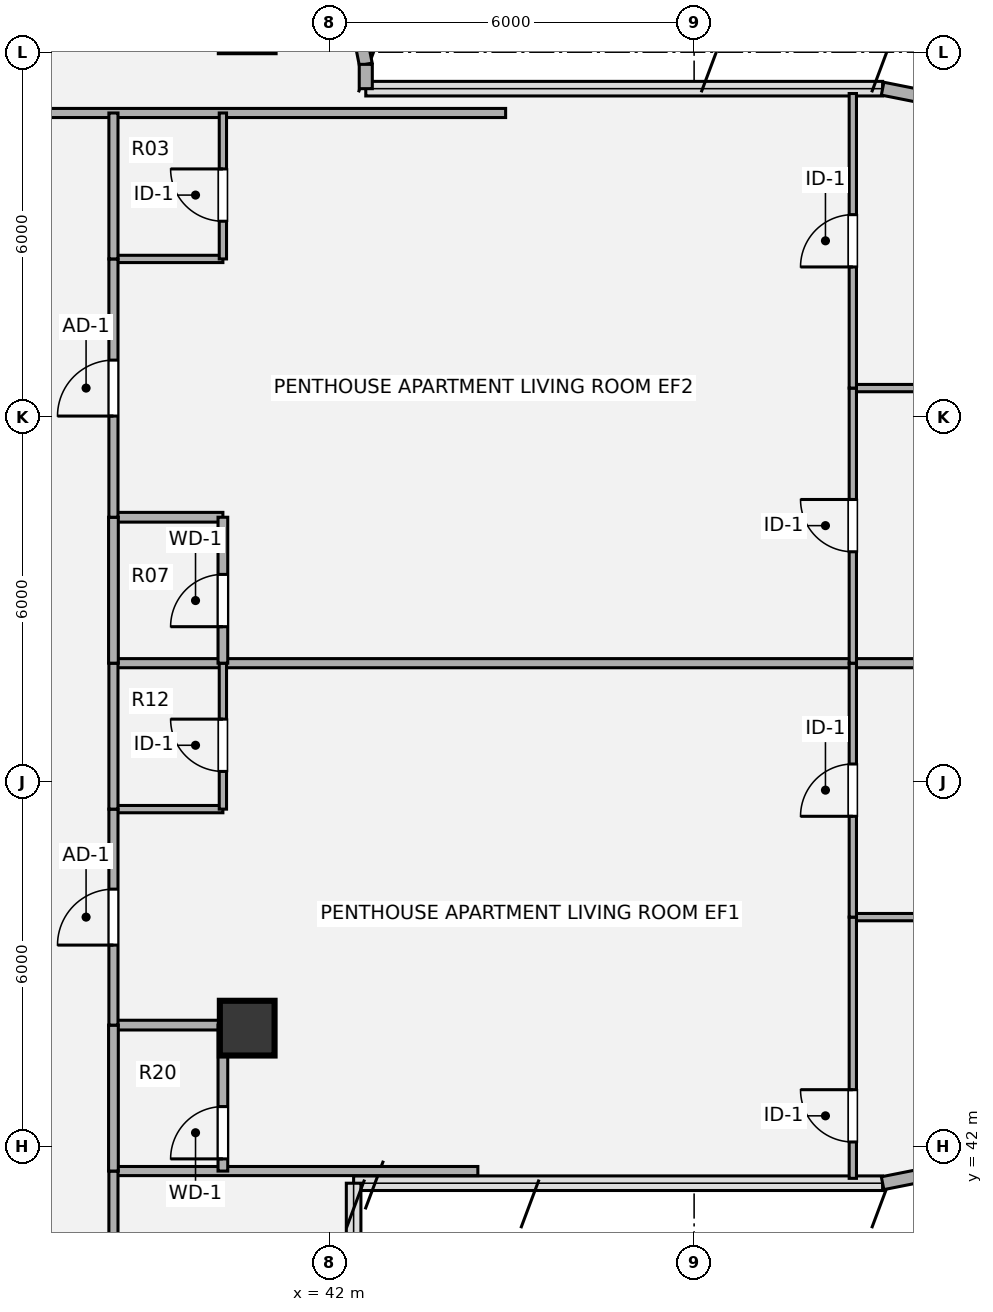
"""IFC4 building model, lengths in metres.
Left out: names, types, materials, properties, quantities, classifications, styles, units other than length and angle.
Written with IfcOpenShell. Run it as: python <this file> out.ifc"""

import sys

from ifc_helpers import new_model, si_unit, direction, frame, frame_2d, origin, origin_2d, place, context, subcontext, project, spatial, rectangle, hollow_circle, extrude, source, transform, mapped, element, fill, save


model = new_model("IFC4")
c1 = context("Model", 3, precision=1e-05, world=origin(), true_north=direction((0.0, 1.0)))
c2 = subcontext(c1, "Body", "Model", "MODEL_VIEW")
j1 = project(units=[si_unit("LENGTHUNIT", "METRE"), si_unit("PLANEANGLEUNIT", "RADIAN")], contexts=[c1])
p1 = place(None, origin())
s1 = spatial("IfcSite", under=j1, at=p1, CompositionType="ELEMENT")
p2 = place(p1, origin())
s2 = spatial("IfcBuilding", under=s1, at=p2, CompositionType="ELEMENT")
p3 = place(p2, frame((0.0, 0.0, 230.58)))
s3 = spatial("IfcBuildingStorey", under=s2, at=p3, CompositionType="ELEMENT", Elevation=230.58)
m1 = source(origin(), c2, "Body", "SweptSolid", [
    extrude(hollow_circle(Radius=0.45, WallThickness=0.032, at=origin_2d()), origin(), (0.0, 0.0, 1.0), 3.78),
])
p4 = place(p3, frame((40.65, 43.95, 0.0), z_axis=(0.0, 0.0, 1.0), x_axis=(1.0, 0.0, 0.0)))
e1 = element("IfcColumn", 1, at=p4, inside=s3, PredefinedType="COLUMN", context=c2, shape_type="MappedRepresentation", body=[
    mapped(m1, transform((0.0, 0.0, 0.0), x_axis=(1.0, 0.0, 0.0), y_axis=(0.0, 1.0, 0.0), z_axis=(0.0, 0.0, 1.0), scale=1.0)),
])
p5 = place(p3, frame((42.402, 60.795, 0.0), z_axis=(0.0, 0.0, 1.0), x_axis=(0.195190360752, -0.980765376158, 0.0)))
e2 = element("IfcWall", 2, at=p5, inside=s3, PredefinedType="SOLIDWALL", context=c2, shape_type="SweptSolid", body=[
    extrude(rectangle(XDim=1.014, YDim=0.215, at=frame_2d((0.507, 0.0))), origin(), (0.0, 0.0, 1.0), 3.53),
])
p6 = place(p3, frame((42.6, 59.8, 0.0), z_axis=(0.0, 0.0, 1.0), x_axis=(0.0, -1.0, 0.0)))
e3 = element("IfcWall", 3, at=p6, inside=s3, PredefinedType="SOLIDWALL", context=c2, shape_type="SweptSolid", body=[
    extrude(rectangle(XDim=0.4, YDim=0.215, at=frame_2d((0.2, 0.0))), origin(), (0.0, 0.0, 1.0), 3.53),
])
for number, where, z_axis, x_axis in (
    (4, (51.1, 59.4, 0.0), (0.0, 0.0, 1.0), (0.981, -0.195, 0.0)),
    (5, (52.325, 41.644, 0.0), (0.0, 0.0, 1.0), (-0.981, -0.195, 0.0)),
):
    element("IfcWall", number, at=place(p3, frame(where, z_axis=z_axis, x_axis=x_axis)), inside=s3, PredefinedType="SOLIDWALL", context=c2, shape_type="SweptSolid", body=[
        extrude(rectangle(XDim=1.249, YDim=0.215, at=frame_2d((0.624, 0.0))), origin(), (0.0, 0.0, 1.0), 3.53),
    ])
p7 = place(p3, frame((38.45, 41.6, 0.0), z_axis=(0.0, 0.0, 1.0), x_axis=(1.0, 0.0, 0.0)))
e6 = element("IfcWall", 6, at=p7, inside=s3, PredefinedType="PARTITIONING", context=c2, shape_type="SweptSolid", body=[
    extrude(rectangle(XDim=5.993, YDim=0.15, at=frame_2d((2.997, 0.0))), origin(), (0.0, 0.0, 1.0), 3.5),
])
p8 = place(p3, frame((38.45, 44.0, 0.0), z_axis=(0.0, 0.0, 1.0), x_axis=(1.0, 0.0, 0.0)))
e7 = element("IfcWall", 7, at=p8, inside=s3, PredefinedType="PLUMBINGWALL", context=c2, shape_type="SweptSolid", body=[
    extrude(rectangle(XDim=1.8, YDim=0.16, at=frame_2d((0.9, 0.0))), origin(), (0.0, 0.0, 1.0), 2.903),
])
p9 = place(p3, frame((50.61, 45.776, 0.0), z_axis=(0.0, 0.0, 1.0), x_axis=(1.0, 0.0, 0.0)))
e8 = element("IfcWall", 8, at=p9, inside=s3, PredefinedType="PARTITIONING", context=c2, shape_type="SweptSolid", body=[
    extrude(rectangle(XDim=3.61, YDim=0.12, at=frame_2d((1.805, 0.0))), origin(), (0.0, 0.0, 1.0), 2.982),
])
p10 = place(p3, frame((38.45, 47.552, 0.0), z_axis=(0.0, 0.0, 1.0), x_axis=(1.0, 0.0, 0.0)))
e9 = element("IfcWall", 9, at=p10, inside=s3, PredefinedType="PARTITIONING", context=c2, shape_type="SweptSolid", body=[
    extrude(rectangle(XDim=1.8, YDim=0.12, at=frame_2d((0.9, 0.0))), origin(), (0.0, 0.0, 1.0), 3.259),
])
p11 = place(p3, frame((38.45, 49.952, 0.0), z_axis=(0.0, 0.0, 1.0), x_axis=(1.0, 0.0, 0.0)))
e10 = element("IfcWall", 10, at=p11, inside=s3, PredefinedType="PARTITIONING", context=c2, shape_type="SweptSolid", body=[
    extrude(rectangle(XDim=15.77, YDim=0.15, at=frame_2d((7.885, 0.0))), origin(), (0.0, 0.0, 1.0), 2.982),
])
p12 = place(p3, frame((38.45, 52.352, 0.0), z_axis=(0.0, 0.0, 1.0), x_axis=(1.0, 0.0, 0.0)))
e11 = element("IfcWall", 11, at=p12, inside=s3, PredefinedType="PLUMBINGWALL", context=c2, shape_type="SweptSolid", body=[
    extrude(rectangle(XDim=1.8, YDim=0.16, at=frame_2d((0.9, 0.0))), origin(), (0.0, 0.0, 1.0), 3.259),
])
p13 = place(p3, frame((50.61, 54.476, 0.0), z_axis=(0.0, 0.0, 1.0), x_axis=(1.0, 0.0, 0.0)))
e12 = element("IfcWall", 12, at=p13, inside=s3, PredefinedType="PARTITIONING", context=c2, shape_type="SweptSolid", body=[
    extrude(rectangle(XDim=3.61, YDim=0.12, at=frame_2d((1.805, 0.0))), origin(), (0.0, 0.0, 1.0), 2.903),
])
p14 = place(p3, frame((38.45, 56.6, 0.0), z_axis=(0.0, 0.0, 1.0), x_axis=(1.0, 0.0, 0.0)))
e13 = element("IfcWall", 13, at=p14, inside=s3, PredefinedType="PARTITIONING", context=c2, shape_type="SweptSolid", body=[
    extrude(rectangle(XDim=1.8, YDim=0.12, at=frame_2d((0.9, 0.0))), origin(), (0.0, 0.0, 1.0), 3.259),
])
p15 = place(p3, frame((27.1, 59.0, 0.0), z_axis=(0.0, 0.0, 1.0), x_axis=(1.0, 0.0, 0.0)))
e14 = element("IfcWall", 14, at=p15, inside=s3, PredefinedType="PARTITIONING", context=c2, shape_type="SweptSolid", body=[
    extrude(rectangle(XDim=17.8, YDim=0.15, at=frame_2d((8.9, 0.0))), origin(), (0.0, 0.0, 1.0), 3.308),
])
p16 = place(p15, frame((8.375, 0.0, 0.0)))
e15 = element("IfcOpeningElement", 15, at=p16, cuts=e14, PredefinedType="OPENING", context=c2, shape_type="SweptSolid", body=[
    extrude(rectangle(XDim=1.05, YDim=2.1, at=origin_2d()), frame((0.525, 0.085, 1.05), z_axis=(0.0, -1.0, 0.0), x_axis=(1.0, 0.0, 0.0)), (0.0, 0.0, 1.0), 0.17),
])
p17 = place(p3, frame((38.45, 22.4, 0.0), z_axis=(0.0, 0.0, 1.0), x_axis=(0.0, 1.0, 0.0)))
e16 = element("IfcWall", 16, at=p17, inside=s3, PredefinedType="PARTITIONING", context=c2, shape_type="SweptSolid", body=[
    extrude(rectangle(XDim=19.2, YDim=0.15, at=frame_2d((9.6, 0.0))), origin(), (0.0, 0.0, 1.0), 3.5),
])
p18 = place(p17, frame((8.975, 0.0, 0.0)))
e17 = element("IfcOpeningElement", 17, at=p18, cuts=e16, PredefinedType="OPENING", context=c2, shape_type="SweptSolid", body=[
    extrude(rectangle(XDim=1.05, YDim=2.1, at=origin_2d()), frame((0.525, 0.085, 1.05), z_axis=(0.0, -1.0, 0.0), x_axis=(1.0, 0.0, 0.0)), (0.0, 0.0, 1.0), 0.17),
])
p19 = place(p3, frame((38.45, 41.6, 0.0), z_axis=(0.0, 0.0, 1.0), x_axis=(0.0, 1.0, 0.0)))
e18 = element("IfcWall", 18, at=p19, inside=s3, PredefinedType="PLUMBINGWALL", context=c2, shape_type="SweptSolid", body=[
    extrude(rectangle(XDim=2.4, YDim=0.16, at=frame_2d((1.2, 0.0))), origin(), (0.0, 0.0, 1.0), 3.5),
])
p20 = place(p3, frame((38.45, 44.0, 0.0), z_axis=(0.0, 0.0, 1.0), x_axis=(0.0, 1.0, 0.0)))
e19 = element("IfcWall", 19, at=p20, inside=s3, PredefinedType="PARTITIONING", context=c2, shape_type="SweptSolid", body=[
    extrude(rectangle(XDim=3.552, YDim=0.15, at=frame_2d((1.776, 0.0))), origin(), (0.0, 0.0, 1.0), 3.5),
])
p21 = place(p20, frame((1.316, 0.0, 0.0)))
e20 = element("IfcOpeningElement", 20, at=p21, cuts=e19, PredefinedType="OPENING", context=c2, shape_type="SweptSolid", body=[
    extrude(rectangle(XDim=0.92, YDim=2.1, at=origin_2d()), frame((0.46, 0.085, 1.05), z_axis=(0.0, -1.0, 0.0), x_axis=(1.0, 0.0, 0.0)), (0.0, 0.0, 1.0), 0.17),
])
p22 = place(p3, frame((38.45, 47.552, 0.0), z_axis=(0.0, 0.0, 1.0), x_axis=(0.0, 1.0, 0.0)))
e21 = element("IfcWall", 21, at=p22, inside=s3, PredefinedType="PARTITIONING", context=c2, shape_type="SweptSolid", body=[
    extrude(rectangle(XDim=2.4, YDim=0.15, at=frame_2d((1.2, 0.0))), origin(), (0.0, 0.0, 1.0), 3.5),
])
p23 = place(p3, frame((38.45, 49.952, 0.0), z_axis=(0.0, 0.0, 1.0), x_axis=(0.0, 1.0, 0.0)))
e22 = element("IfcWall", 22, at=p23, inside=s3, PredefinedType="PLUMBINGWALL", context=c2, shape_type="SweptSolid", body=[
    extrude(rectangle(XDim=2.4, YDim=0.16, at=frame_2d((1.2, 0.0))), origin(), (0.0, 0.0, 1.0), 3.5),
])
p24 = place(p3, frame((38.45, 52.352, 0.0), z_axis=(0.0, 0.0, 1.0), x_axis=(0.0, 1.0, 0.0)))
e23 = element("IfcWall", 23, at=p24, inside=s3, PredefinedType="PARTITIONING", context=c2, shape_type="SweptSolid", body=[
    extrude(rectangle(XDim=4.248, YDim=0.15, at=frame_2d((2.124, 0.0))), origin(), (0.0, 0.0, 1.0), 3.5),
])
p25 = place(p24, frame((1.664, 0.0, 0.0)))
e24 = element("IfcOpeningElement", 24, at=p25, cuts=e23, PredefinedType="OPENING", context=c2, shape_type="SweptSolid", body=[
    extrude(rectangle(XDim=0.92, YDim=2.1, at=origin_2d()), frame((0.46, 0.085, 1.05), z_axis=(0.0, -1.0, 0.0), x_axis=(1.0, 0.0, 0.0)), (0.0, 0.0, 1.0), 0.17),
])
p26 = place(p3, frame((38.45, 56.6, 0.0), z_axis=(0.0, 0.0, 1.0), x_axis=(0.0, 1.0, 0.0)))
e25 = element("IfcWall", 25, at=p26, inside=s3, PredefinedType="PARTITIONING", context=c2, shape_type="SweptSolid", body=[
    extrude(rectangle(XDim=2.4, YDim=0.15, at=frame_2d((1.2, 0.0))), origin(), (0.0, 0.0, 1.0), 3.5),
])
p27 = place(p3, frame((40.25, 41.6, 0.0), z_axis=(0.0, 0.0, 1.0), x_axis=(0.0, 1.0, 0.0)))
e26 = element("IfcWall", 26, at=p27, inside=s3, PredefinedType="PLUMBINGWALL", context=c2, shape_type="SweptSolid", body=[
    extrude(rectangle(XDim=2.4, YDim=0.16, at=frame_2d((1.2, 0.0))), origin(), (0.0, 0.0, 1.0), 3.5),
])
p28 = place(p27, frame((0.2, 0.0, 0.0)))
e27 = element("IfcOpeningElement", 27, at=p28, cuts=e26, PredefinedType="OPENING", context=c2, shape_type="SweptSolid", body=[
    extrude(rectangle(XDim=0.86, YDim=2.1, at=origin_2d()), frame((0.43, 0.09, 1.05), z_axis=(0.0, -1.0, 0.0), x_axis=(1.0, 0.0, 0.0)), (0.0, 0.0, 1.0), 0.18),
])
p29 = place(p3, frame((40.25, 47.552, 0.0), z_axis=(0.0, 0.0, 1.0), x_axis=(0.0, 1.0, 0.0)))
e28 = element("IfcWall", 28, at=p29, inside=s3, PredefinedType="PARTITIONING", context=c2, shape_type="SweptSolid", body=[
    extrude(rectangle(XDim=2.4, YDim=0.12, at=frame_2d((1.2, 0.0))), origin(), (0.0, 0.0, 1.0), 3.5),
])
p30 = place(p29, frame((0.62, 0.0, 0.0)))
e29 = element("IfcOpeningElement", 29, at=p30, cuts=e28, PredefinedType="OPENING", context=c2, shape_type="SweptSolid", body=[
    extrude(rectangle(XDim=0.86, YDim=2.1, at=origin_2d()), frame((0.43, 0.07, 1.05), z_axis=(0.0, -1.0, 0.0), x_axis=(1.0, 0.0, 0.0)), (0.0, 0.0, 1.0), 0.14),
])
p31 = place(p3, frame((40.25, 49.952, 0.0), z_axis=(0.0, 0.0, 1.0), x_axis=(0.0, 1.0, 0.0)))
e30 = element("IfcWall", 30, at=p31, inside=s3, PredefinedType="PLUMBINGWALL", context=c2, shape_type="SweptSolid", body=[
    extrude(rectangle(XDim=2.4, YDim=0.16, at=frame_2d((1.2, 0.0))), origin(), (0.0, 0.0, 1.0), 3.5),
])
p32 = place(p31, frame((0.6, 0.0, 0.0)))
e31 = element("IfcOpeningElement", 31, at=p32, cuts=e30, PredefinedType="OPENING", context=c2, shape_type="SweptSolid", body=[
    extrude(rectangle(XDim=0.86, YDim=2.1, at=origin_2d()), frame((0.43, 0.09, 1.05), z_axis=(0.0, -1.0, 0.0), x_axis=(1.0, 0.0, 0.0)), (0.0, 0.0, 1.0), 0.18),
])
p33 = place(p3, frame((40.25, 56.6, 0.0), z_axis=(0.0, 0.0, 1.0), x_axis=(0.0, 1.0, 0.0)))
e32 = element("IfcWall", 32, at=p33, inside=s3, PredefinedType="PARTITIONING", context=c2, shape_type="SweptSolid", body=[
    extrude(rectangle(XDim=2.4, YDim=0.12, at=frame_2d((1.2, 0.0))), origin(), (0.0, 0.0, 1.0), 3.5),
])
p34 = place(p33, frame((0.62, 0.0, 0.0)))
e33 = element("IfcOpeningElement", 33, at=p34, cuts=e32, PredefinedType="OPENING", context=c2, shape_type="SweptSolid", body=[
    extrude(rectangle(XDim=0.86, YDim=2.1, at=origin_2d()), frame((0.43, 0.07, 1.05), z_axis=(0.0, -1.0, 0.0), x_axis=(1.0, 0.0, 0.0)), (0.0, 0.0, 1.0), 0.14),
])
p35 = place(p3, frame((50.61, 41.48, 0.0), z_axis=(0.0, 0.0, 1.0), x_axis=(0.0, 1.0, 0.0)))
e34 = element("IfcWall", 34, at=p35, inside=s3, PredefinedType="PARTITIONING", context=c2, shape_type="SweptSolid", body=[
    extrude(rectangle(XDim=4.296, YDim=0.12, at=frame_2d((2.148, 0.0))), origin(), (0.0, 0.0, 1.0), 3.5),
])
p36 = place(p35, frame((0.598, 0.0, 0.0)))
e35 = element("IfcOpeningElement", 35, at=p36, cuts=e34, PredefinedType="OPENING", context=c2, shape_type="SweptSolid", body=[
    extrude(rectangle(XDim=0.86, YDim=2.1, at=origin_2d()), frame((0.43, 0.07, 1.05), z_axis=(0.0, -1.0, 0.0), x_axis=(1.0, 0.0, 0.0)), (0.0, 0.0, 1.0), 0.14),
])
p37 = place(p3, frame((50.61, 45.776, 0.0), z_axis=(0.0, 0.0, 1.0), x_axis=(0.0, 1.0, 0.0)))
e36 = element("IfcWall", 36, at=p37, inside=s3, PredefinedType="PARTITIONING", context=c2, shape_type="SweptSolid", body=[
    extrude(rectangle(XDim=4.176, YDim=0.12, at=frame_2d((2.088, 0.0))), origin(), (0.0, 0.0, 1.0), 3.5),
])
p38 = place(p37, frame((1.658, 0.0, 0.0)))
e37 = element("IfcOpeningElement", 37, at=p38, cuts=e36, PredefinedType="OPENING", context=c2, shape_type="SweptSolid", body=[
    extrude(rectangle(XDim=0.86, YDim=2.1, at=origin_2d()), frame((0.43, 0.07, 1.05), z_axis=(0.0, -1.0, 0.0), x_axis=(1.0, 0.0, 0.0)), (0.0, 0.0, 1.0), 0.14),
])
p39 = place(p3, frame((50.61, 49.952, 0.0), z_axis=(0.0, 0.0, 1.0), x_axis=(0.0, 1.0, 0.0)))
e38 = element("IfcWall", 38, at=p39, inside=s3, PredefinedType="PARTITIONING", context=c2, shape_type="SweptSolid", body=[
    extrude(rectangle(XDim=4.524, YDim=0.12, at=frame_2d((2.262, 0.0))), origin(), (0.0, 0.0, 1.0), 3.5),
])
p40 = place(p39, frame((1.832, 0.0, 0.0)))
e39 = element("IfcOpeningElement", 39, at=p40, cuts=e38, PredefinedType="OPENING", context=c2, shape_type="SweptSolid", body=[
    extrude(rectangle(XDim=0.86, YDim=2.1, at=origin_2d()), frame((0.43, 0.07, 1.05), z_axis=(0.0, -1.0, 0.0), x_axis=(1.0, 0.0, 0.0)), (0.0, 0.0, 1.0), 0.14),
])
p41 = place(p3, frame((50.61, 54.476, 0.0), z_axis=(0.0, 0.0, 1.0), x_axis=(0.0, 1.0, 0.0)))
e40 = element("IfcWall", 40, at=p41, inside=s3, PredefinedType="PARTITIONING", context=c2, shape_type="SweptSolid", body=[
    extrude(rectangle(XDim=4.844, YDim=0.12, at=frame_2d((2.422, 0.0))), origin(), (0.0, 0.0, 1.0), 3.5),
])
p42 = place(p41, frame((1.992, 0.0, 0.0)))
e41 = element("IfcOpeningElement", 41, at=p42, cuts=e40, PredefinedType="OPENING", context=c2, shape_type="SweptSolid", body=[
    extrude(rectangle(XDim=0.86, YDim=2.1, at=origin_2d()), frame((0.43, 0.07, 1.05), z_axis=(0.0, -1.0, 0.0), x_axis=(1.0, 0.0, 0.0)), (0.0, 0.0, 1.0), 0.14),
])
m2 = source(origin(), c2, "Body", "SweptSolid", [
    extrude(rectangle(XDim=0.92, YDim=2.1, at=origin_2d()), frame((0.46, 0.025, 1.05), z_axis=(0.0, -1.0, 0.0), x_axis=(1.0, 0.0, 0.0)), (0.0, 0.0, 1.0), 0.05),
])
p43 = place(p21, origin())
e42 = element("IfcDoor", 42, at=p43, inside=s3, OperationType="SINGLE_SWING_LEFT", PredefinedType="DOOR", context=c2, shape_type="MappedRepresentation", body=[
    mapped(m2, transform((0.0, 0.0, 0.0), x_axis=(1.0, 0.0, 0.0), y_axis=(0.0, 1.0, 0.0), z_axis=(0.0, 0.0, 1.0), scale=1.0)),
])
fill(e20, e42)
p44 = place(p25, origin())
e43 = element("IfcDoor", 43, at=p44, inside=s3, OperationType="SINGLE_SWING_LEFT", PredefinedType="DOOR", context=c2, shape_type="MappedRepresentation", body=[
    mapped(m2, transform((0.0, 0.0, 0.0), x_axis=(1.0, 0.0, 0.0), y_axis=(0.0, 1.0, 0.0), z_axis=(0.0, 0.0, 1.0), scale=1.0)),
])
fill(e24, e43)
m3 = source(origin(), c2, "Body", "SweptSolid", [
    extrude(rectangle(XDim=0.86, YDim=2.1, at=origin_2d()), frame((0.43, 0.025, 1.05), z_axis=(0.0, -1.0, 0.0), x_axis=(1.0, 0.0, 0.0)), (0.0, 0.0, 1.0), 0.05),
])
p45 = place(p28, origin())
e44 = element("IfcDoor", 44, at=p45, inside=s3, OperationType="SINGLE_SWING_LEFT", PredefinedType="DOOR", context=c2, shape_type="MappedRepresentation", body=[
    mapped(m3, transform((0.0, 0.0, 0.0), x_axis=(1.0, 0.0, 0.0), y_axis=(0.0, 1.0, 0.0), z_axis=(0.0, 0.0, 1.0), scale=1.0)),
])
fill(e27, e44)
m4 = source(origin(), c2, "Body", "SweptSolid", [
    extrude(rectangle(XDim=0.86, YDim=2.1, at=origin_2d()), frame((0.43, 0.025, 1.05), z_axis=(0.0, -1.0, 0.0), x_axis=(1.0, 0.0, 0.0)), (0.0, 0.0, 1.0), 0.05),
])
p46 = place(p30, origin())
e45 = element("IfcDoor", 45, at=p46, inside=s3, OperationType="SINGLE_SWING_RIGHT", PredefinedType="DOOR", context=c2, shape_type="MappedRepresentation", body=[
    mapped(m4, transform((0.0, 0.0, 0.0), x_axis=(1.0, 0.0, 0.0), y_axis=(0.0, 1.0, 0.0), z_axis=(0.0, 0.0, 1.0), scale=1.0)),
])
fill(e29, e45)
p47 = place(p32, origin())
e46 = element("IfcDoor", 46, at=p47, inside=s3, OperationType="SINGLE_SWING_LEFT", PredefinedType="DOOR", context=c2, shape_type="MappedRepresentation", body=[
    mapped(m3, transform((0.0, 0.0, 0.0), x_axis=(1.0, 0.0, 0.0), y_axis=(0.0, 1.0, 0.0), z_axis=(0.0, 0.0, 1.0), scale=1.0)),
])
fill(e31, e46)
p48 = place(p34, origin())
e47 = element("IfcDoor", 47, at=p48, inside=s3, OperationType="SINGLE_SWING_RIGHT", PredefinedType="DOOR", context=c2, shape_type="MappedRepresentation", body=[
    mapped(m4, transform((0.0, 0.0, 0.0), x_axis=(1.0, 0.0, 0.0), y_axis=(0.0, 1.0, 0.0), z_axis=(0.0, 0.0, 1.0), scale=1.0)),
])
fill(e33, e47)
p49 = place(p36, origin())
e48 = element("IfcDoor", 48, at=p49, inside=s3, OperationType="SINGLE_SWING_RIGHT", PredefinedType="DOOR", context=c2, shape_type="MappedRepresentation", body=[
    mapped(m4, transform((0.0, 0.0, 0.0), x_axis=(1.0, 0.0, 0.0), y_axis=(0.0, 1.0, 0.0), z_axis=(0.0, 0.0, 1.0), scale=1.0)),
])
fill(e35, e48)
p50 = place(p38, origin())
e49 = element("IfcDoor", 49, at=p50, inside=s3, OperationType="SINGLE_SWING_LEFT", PredefinedType="DOOR", context=c2, shape_type="MappedRepresentation", body=[
    mapped(m4, transform((0.0, 0.0, 0.0), x_axis=(1.0, 0.0, 0.0), y_axis=(0.0, 1.0, 0.0), z_axis=(0.0, 0.0, 1.0), scale=1.0)),
])
fill(e37, e49)
p51 = place(p40, origin())
e50 = element("IfcDoor", 50, at=p51, inside=s3, OperationType="SINGLE_SWING_RIGHT", PredefinedType="DOOR", context=c2, shape_type="MappedRepresentation", body=[
    mapped(m4, transform((0.0, 0.0, 0.0), x_axis=(1.0, 0.0, 0.0), y_axis=(0.0, 1.0, 0.0), z_axis=(0.0, 0.0, 1.0), scale=1.0)),
])
fill(e39, e50)
p52 = place(p42, origin())
e51 = element("IfcDoor", 51, at=p52, inside=s3, OperationType="SINGLE_SWING_LEFT", PredefinedType="DOOR", context=c2, shape_type="MappedRepresentation", body=[
    mapped(m4, transform((0.0, 0.0, 0.0), x_axis=(1.0, 0.0, 0.0), y_axis=(0.0, 1.0, 0.0), z_axis=(0.0, 0.0, 1.0), scale=1.0)),
])
fill(e41, e51)
save(model, sys.argv[1])
